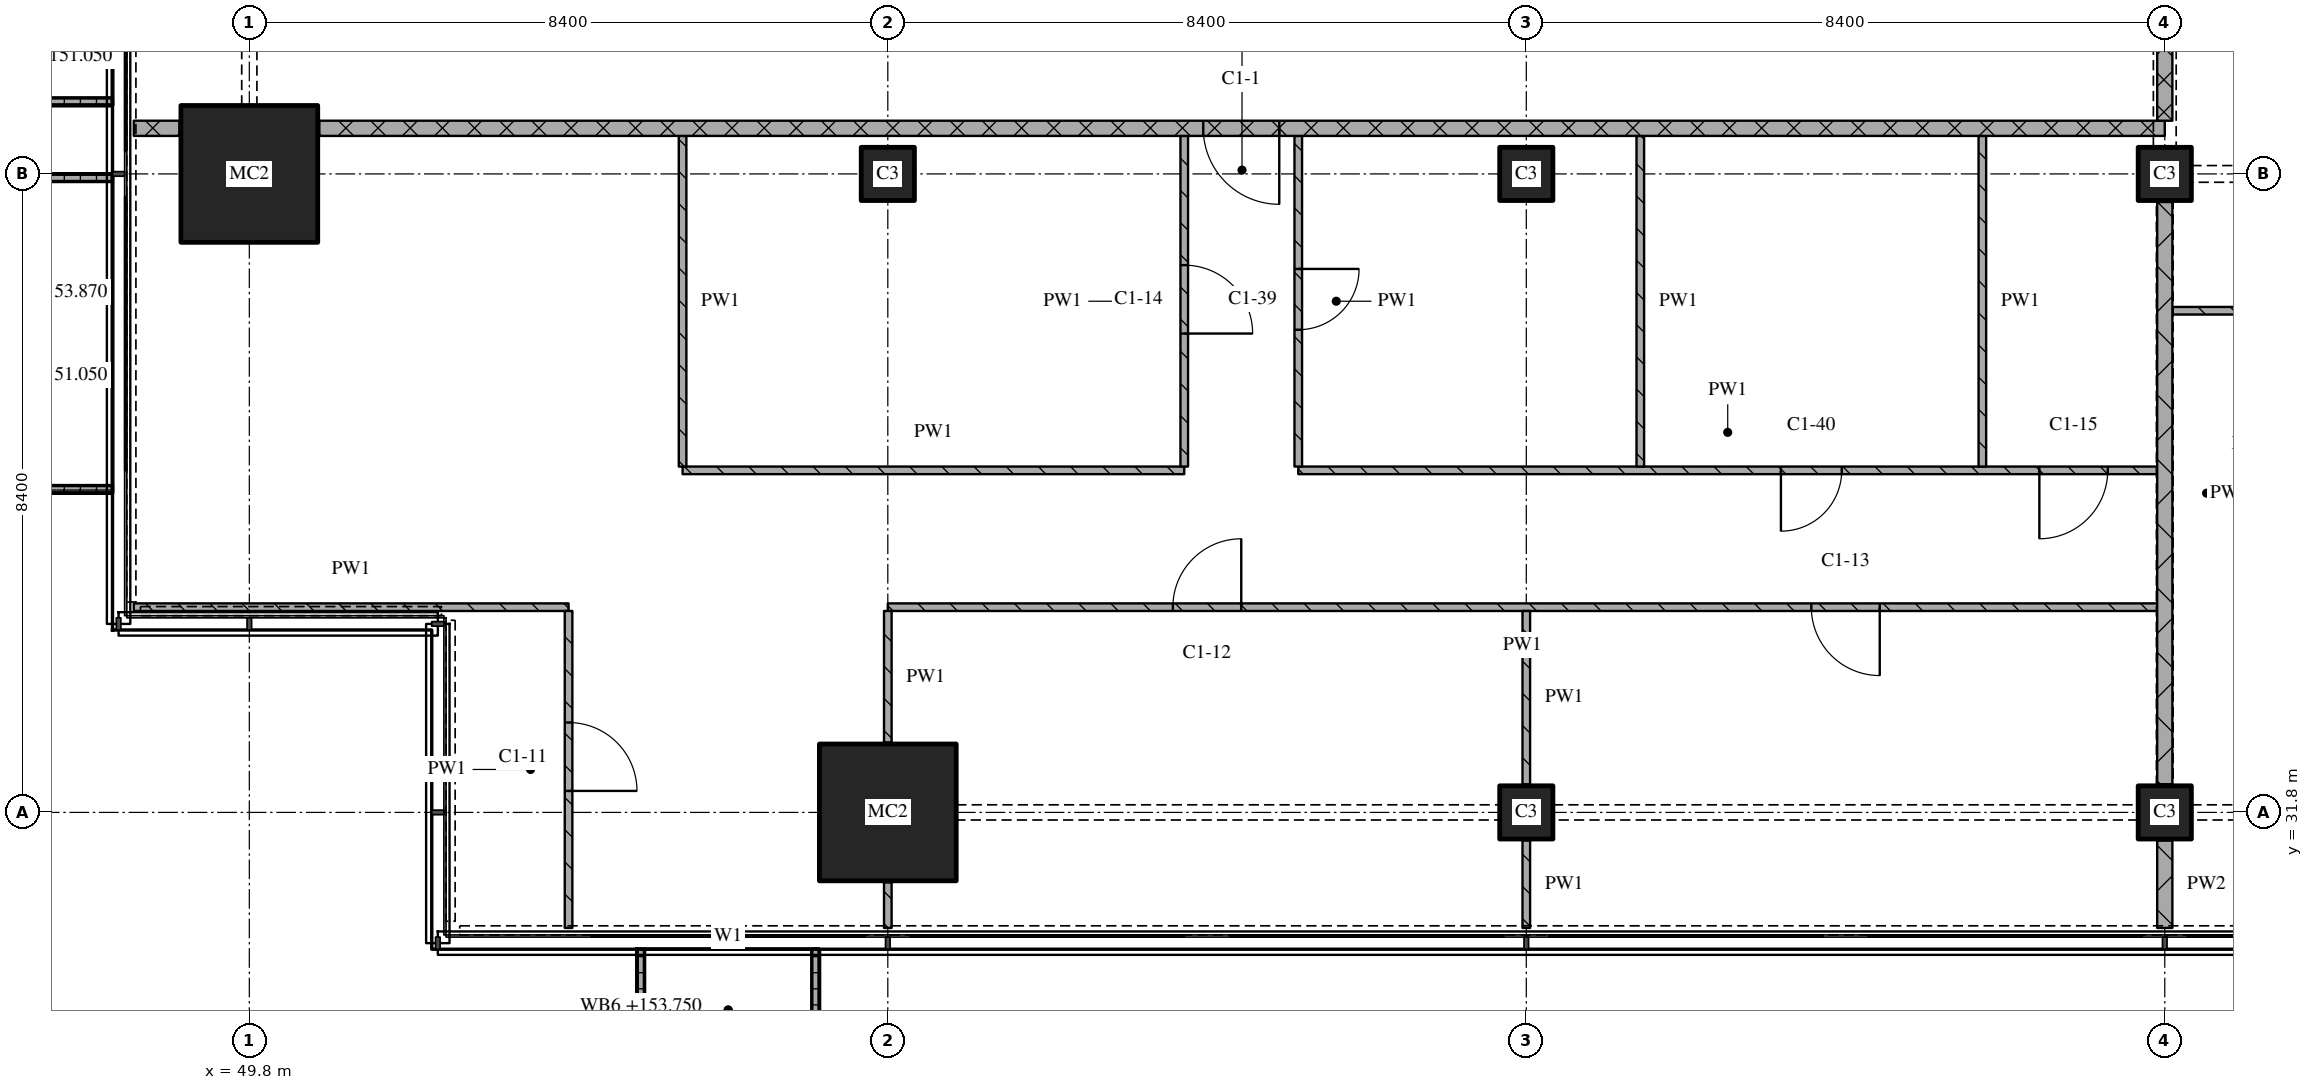
"""IFC4 building model, lengths in metres.
Left out: names, types, materials, properties, quantities, classifications, styles, units other than length and angle.
Written with IfcOpenShell. Run it as: python <this file> out.ifc"""

import sys

from ifc_helpers import new_model, si_unit, direction, frame, frame_2d, origin, origin_2d, place, context, subcontext, project, spatial, polyline, rectangle, outline, extrude, element, fill, save


model = new_model("IFC4")
c1 = context("Model", 3, precision=1e-05, world=origin(), true_north=direction((0.0, 1.0)))
c2 = subcontext(c1, "Body", "Model", "MODEL_VIEW")
j1 = project(units=[si_unit("LENGTHUNIT", "METRE"), si_unit("PLANEANGLEUNIT", "RADIAN")], contexts=[c1])
p1 = place(None, origin())
s1 = spatial("IfcSite", under=j1, at=p1, CompositionType="ELEMENT")
p2 = place(p1, origin())
s2 = spatial("IfcBuilding", under=s1, at=p2, CompositionType="ELEMENT")
p3 = place(p2, frame((0.0, 0.0, 151.05)))
s3 = spatial("IfcBuildingStorey", under=s2, at=p3, CompositionType="ELEMENT", Elevation=151.05)
for number, where, z_axis, x_axis in (
    (1, (49.8, 40.2, 0.0), (0.0, 0.0, 1.0), (1.0, 0.0, 0.0)),
    (2, (58.2, 31.8, 0.0), (0.0, 0.0, 1.0), (1.0, 0.0, 0.0)),
):
    element("IfcColumn", number, at=place(p3, frame(where, z_axis=z_axis, x_axis=x_axis)), inside=s3, PredefinedType="COLUMN", context=c2, shape_type="SweptSolid", body=[
        extrude(rectangle(XDim=1.8, YDim=1.8, at=origin_2d()), origin(), (0.0, 0.0, 1.0), 3.6),
    ])
for number, where, z_axis, x_axis in (
    (3, (58.2, 40.2, 0.0), (0.0, 0.0, 1.0), (1.0, 0.0, 0.0)),
    (4, (66.6, 31.8, 0.0), (0.0, 0.0, 1.0), (1.0, 0.0, 0.0)),
    (5, (66.6, 40.2, 0.0), (0.0, 0.0, 1.0), (1.0, 0.0, 0.0)),
    (6, (75.0, 31.8, 0.0), (0.0, 0.0, 1.0), (1.0, 0.0, 0.0)),
    (7, (75.0, 40.2, 0.0), (0.0, 0.0, 1.0), (1.0, 0.0, 0.0)),
):
    element("IfcColumn", number, at=place(p3, frame(where, z_axis=z_axis, x_axis=x_axis)), inside=s3, PredefinedType="COLUMN", context=c2, shape_type="SweptSolid", body=[
        extrude(rectangle(XDim=0.7, YDim=0.7, at=origin_2d()), origin(), (0.0, 0.0, 1.0), 3.6),
    ])
p4 = place(p3, origin())
e8 = element("IfcWall", 8, at=p4, inside=s3, PredefinedType="SOLIDWALL", context=c2, shape_type="SweptSolid", body=[
    extrude(outline(polyline([(54.9, 30.0), (55.0, 30.0), (55.0, 28.5), (57.2, 28.5), (57.2, 30.0), (57.3, 30.0), (57.3, 28.4), (54.9, 28.4), (54.9, 30.0)])), origin(), (0.0, 0.0, 1.0), 1.0),
])
p5 = place(p3, origin())
e9 = element("IfcWall", 9, at=p5, inside=s3, PredefinedType="SOLIDWALL", context=c2, shape_type="SweptSolid", body=[
    extrude(outline(polyline([(48.0, 43.5), (48.0, 43.4), (46.5, 43.4), (46.5, 41.2), (48.0, 41.2), (48.0, 41.1), (46.4, 41.1), (46.4, 43.5), (48.0, 43.5)])), origin(), (0.0, 0.0, 1.0), 1.0),
])
p6 = place(p3, origin())
e10 = element("IfcWall", 10, at=p6, inside=s3, PredefinedType="SOLIDWALL", context=c2, shape_type="SweptSolid", body=[
    extrude(outline(polyline([(48.0, 40.2), (48.0, 40.1), (46.367, 40.1), (46.367, 36.1), (48.0, 36.1), (48.0, 36.0), (46.267, 36.0), (46.267, 40.2), (48.0, 40.2)])), origin(), (0.0, 0.0, 1.0), 1.0),
])
p7 = place(p3, frame((48.28, 34.5, 0.0), z_axis=(0.0, 0.0, 1.0), x_axis=(1.0, 0.0, 0.0)))
e11 = element("IfcWall", 11, at=p7, inside=s3, PredefinedType="PARTITIONING", context=c2, shape_type="SweptSolid", body=[
    extrude(rectangle(XDim=5.72, YDim=0.1, at=frame_2d((2.86, 0.0))), origin(), (0.0, 0.0, 1.0), 3.32),
])
p8 = place(p3, frame((74.9, 34.5, 0.0), z_axis=(0.0, 0.0, 1.0), x_axis=(-1.0, 0.0, 0.0)))
e12 = element("IfcWall", 12, at=p8, inside=s3, PredefinedType="PARTITIONING", context=c2, shape_type="SweptSolid", body=[
    extrude(rectangle(XDim=16.7, YDim=0.1, at=frame_2d((8.35, 0.0))), origin(), (0.0, 0.0, 1.0), 3.32),
])
p9 = place(p8, frame((3.65, 0.0, 0.0)))
e13 = element("IfcOpeningElement", 13, at=p9, cuts=e12, PredefinedType="OPENING", context=c2, shape_type="SweptSolid", body=[
    extrude(rectangle(XDim=0.9, YDim=2.1, at=frame_2d((0.45, 1.05))), frame((0.0, 0.06, 0.0), z_axis=(0.0, -1.0, 0.0), x_axis=(1.0, 0.0, 0.0)), (0.0, 0.0, 1.0), 0.12),
])
p10 = place(p8, frame((12.05, 0.0, 0.0)))
e14 = element("IfcOpeningElement", 14, at=p10, cuts=e12, PredefinedType="OPENING", context=c2, shape_type="SweptSolid", body=[
    extrude(rectangle(XDim=0.9, YDim=2.1, at=frame_2d((0.45, 1.05))), frame((0.0, 0.06, 0.0), z_axis=(0.0, -1.0, 0.0), x_axis=(1.0, 0.0, 0.0)), (0.0, 0.0, 1.0), 0.12),
])
p11 = place(p3, frame((55.5, 36.3, 0.0), z_axis=(0.0, 0.0, 1.0), x_axis=(1.0, 0.0, 0.0)))
e15 = element("IfcWall", 15, at=p11, inside=s3, PredefinedType="PARTITIONING", context=c2, shape_type="SweptSolid", body=[
    extrude(rectangle(XDim=6.6, YDim=0.1, at=frame_2d((3.3, 0.0))), origin(), (0.0, 0.0, 1.0), 3.32),
])
p12 = place(p3, frame((63.6, 36.3, 0.0), z_axis=(0.0, 0.0, 1.0), x_axis=(1.0, 0.0, 0.0)))
e16 = element("IfcWall", 16, at=p12, inside=s3, PredefinedType="PARTITIONING", context=c2, shape_type="SweptSolid", body=[
    extrude(rectangle(XDim=11.3, YDim=0.1, at=frame_2d((5.65, 0.0))), origin(), (0.0, 0.0, 1.0), 3.32),
])
p13 = place(p12, frame((6.35, 0.0, 0.0)))
e17 = element("IfcOpeningElement", 17, at=p13, cuts=e16, PredefinedType="OPENING", context=c2, shape_type="SweptSolid", body=[
    extrude(rectangle(XDim=0.8, YDim=2.1, at=frame_2d((0.4, 1.05))), frame((0.0, 0.06, 0.0), z_axis=(0.0, -1.0, 0.0), x_axis=(1.0, 0.0, 0.0)), (0.0, 0.0, 1.0), 0.12),
])
p14 = place(p12, frame((9.75, 0.0, 0.0)))
e18 = element("IfcOpeningElement", 18, at=p14, cuts=e16, PredefinedType="OPENING", context=c2, shape_type="SweptSolid", body=[
    extrude(rectangle(XDim=0.9, YDim=2.1, at=frame_2d((0.45, 1.05))), frame((0.0, 0.06, 0.0), z_axis=(0.0, -1.0, 0.0), x_axis=(1.0, 0.0, 0.0)), (0.0, 0.0, 1.0), 0.12),
])
p15 = place(p3, frame((75.1, 38.4, 0.0), z_axis=(0.0, 0.0, 1.0), x_axis=(1.0, 0.0, 0.0)))
e19 = element("IfcWall", 19, at=p15, inside=s3, PredefinedType="PARTITIONING", context=c2, shape_type="SweptSolid", body=[
    extrude(rectangle(XDim=2.9, YDim=0.1, at=frame_2d((1.45, 0.0))), origin(), (0.0, 0.0, 1.0), 3.32),
])
p16 = place(p15, frame((1.0, 0.0, 0.0)))
e20 = element("IfcOpeningElement", 20, at=p16, cuts=e19, PredefinedType="OPENING", context=c2, shape_type="SweptSolid", body=[
    extrude(rectangle(XDim=0.8, YDim=2.1, at=frame_2d((0.4, 1.05))), frame((0.0, 0.06, 0.0), z_axis=(0.0, -1.0, 0.0), x_axis=(1.0, 0.0, 0.0)), (0.0, 0.0, 1.0), 0.12),
])
p17 = place(p3, frame((48.28, 40.8, 0.0), z_axis=(0.0, 0.0, 1.0), x_axis=(1.0, 0.0, 0.0)))
e21 = element("IfcWall", 21, at=p17, inside=s3, PredefinedType="PARTITIONING", context=c2, shape_type="SweptSolid", body=[
    extrude(rectangle(XDim=0.6, YDim=0.2, at=frame_2d((0.3, 0.0))), origin(), (0.0, 0.0, 1.0), 3.32),
])
p18 = place(p3, frame((75.0, 40.8, 0.0), z_axis=(0.0, 0.0, 1.0), x_axis=(-1.0, 0.0, 0.0)))
e22 = element("IfcWall", 22, at=p18, inside=s3, PredefinedType="PARTITIONING", context=c2, shape_type="SweptSolid", body=[
    extrude(rectangle(XDim=24.28, YDim=0.2, at=frame_2d((12.14, 0.0))), origin(), (0.0, 0.0, 1.0), 3.32),
])
p19 = place(p18, frame((11.65, 0.0, 0.0)))
e23 = element("IfcOpeningElement", 23, at=p19, cuts=e22, PredefinedType="OPENING", context=c2, shape_type="SweptSolid", body=[
    extrude(rectangle(XDim=1.0, YDim=2.1, at=frame_2d((0.5, 1.05))), frame((0.0, 0.11, 0.0), z_axis=(0.0, -1.0, 0.0), x_axis=(1.0, 0.0, 0.0)), (0.0, 0.0, 1.0), 0.22),
])
p20 = place(p3, frame((54.0, 30.28, 0.0), z_axis=(0.0, 0.0, 1.0), x_axis=(0.0, 1.0, 0.0)))
e24 = element("IfcWall", 24, at=p20, inside=s3, PredefinedType="PARTITIONING", context=c2, shape_type="SweptSolid", body=[
    extrude(rectangle(XDim=4.17, YDim=0.1, at=frame_2d((2.085, 0.0))), origin(), (0.0, 0.0, 1.0), 3.32),
])
p21 = place(p20, frame((1.803, 0.0, 0.0)))
e25 = element("IfcOpeningElement", 25, at=p21, cuts=e24, PredefinedType="OPENING", context=c2, shape_type="SweptSolid", body=[
    extrude(rectangle(XDim=0.9, YDim=2.1, at=frame_2d((0.45, 1.05))), frame((0.0, 0.06, 0.0), z_axis=(0.0, -1.0, 0.0), x_axis=(1.0, 0.0, 0.0)), (0.0, 0.0, 1.0), 0.12),
])
p22 = place(p3, frame((55.5, 40.7, 0.0), z_axis=(0.0, 0.0, 1.0), x_axis=(0.0, -1.0, 0.0)))
e26 = element("IfcWall", 26, at=p22, inside=s3, PredefinedType="PARTITIONING", context=c2, shape_type="SweptSolid", body=[
    extrude(rectangle(XDim=4.35, YDim=0.1, at=frame_2d((2.175, 0.0))), origin(), (0.0, 0.0, 1.0), 3.32),
])
p23 = place(p3, frame((58.2, 30.88, 0.0), z_axis=(0.0, 0.0, 1.0), x_axis=(0.0, -1.0, 0.0)))
e27 = element("IfcWall", 27, at=p23, inside=s3, PredefinedType="PARTITIONING", context=c2, shape_type="SweptSolid", body=[
    extrude(rectangle(XDim=0.6, YDim=0.1, at=frame_2d((0.3, 0.0))), origin(), (0.0, 0.0, 1.0), 3.32),
])
p24 = place(p3, frame((58.2, 34.45, 0.0), z_axis=(0.0, 0.0, 1.0), x_axis=(0.0, -1.0, 0.0)))
e28 = element("IfcWall", 28, at=p24, inside=s3, PredefinedType="PARTITIONING", context=c2, shape_type="SweptSolid", body=[
    extrude(rectangle(XDim=1.73, YDim=0.1, at=frame_2d((0.865, 0.0))), origin(), (0.0, 0.0, 1.0), 3.32),
])
p25 = place(p3, frame((62.1, 36.35, 0.0), z_axis=(0.0, 0.0, 1.0), x_axis=(0.0, 1.0, 0.0)))
e29 = element("IfcWall", 29, at=p25, inside=s3, PredefinedType="PARTITIONING", context=c2, shape_type="SweptSolid", body=[
    extrude(rectangle(XDim=4.35, YDim=0.1, at=frame_2d((2.175, 0.0))), origin(), (0.0, 0.0, 1.0), 3.32),
])
p26 = place(p25, frame((1.75, 0.0, 0.0)))
e30 = element("IfcOpeningElement", 30, at=p26, cuts=e29, PredefinedType="OPENING", context=c2, shape_type="SweptSolid", body=[
    extrude(rectangle(XDim=0.9, YDim=2.1, at=frame_2d((0.45, 1.05))), frame((0.0, 0.06, 0.0), z_axis=(0.0, -1.0, 0.0), x_axis=(1.0, 0.0, 0.0)), (0.0, 0.0, 1.0), 0.12),
])
p27 = place(p3, frame((63.6, 40.7, 0.0), z_axis=(0.0, 0.0, 1.0), x_axis=(0.0, -1.0, 0.0)))
e31 = element("IfcWall", 31, at=p27, inside=s3, PredefinedType="PARTITIONING", context=c2, shape_type="SweptSolid", body=[
    extrude(rectangle(XDim=4.35, YDim=0.1, at=frame_2d((2.175, 0.0))), origin(), (0.0, 0.0, 1.0), 3.32),
])
p28 = place(p27, frame((1.75, 0.0, 0.0)))
e32 = element("IfcOpeningElement", 32, at=p28, cuts=e31, PredefinedType="OPENING", context=c2, shape_type="SweptSolid", body=[
    extrude(rectangle(XDim=0.8, YDim=2.1, at=frame_2d((0.4, 1.05))), frame((0.0, 0.06, 0.0), z_axis=(0.0, -1.0, 0.0), x_axis=(1.0, 0.0, 0.0)), (0.0, 0.0, 1.0), 0.12),
])
p29 = place(p3, frame((66.6, 31.43, 0.0), z_axis=(0.0, 0.0, 1.0), x_axis=(0.0, -1.0, 0.0)))
e33 = element("IfcWall", 33, at=p29, inside=s3, PredefinedType="PARTITIONING", context=c2, shape_type="SweptSolid", body=[
    extrude(rectangle(XDim=1.15, YDim=0.1, at=frame_2d((0.575, 0.0))), origin(), (0.0, 0.0, 1.0), 3.32),
])
p30 = place(p3, frame((66.6, 34.45, 0.0), z_axis=(0.0, 0.0, 1.0), x_axis=(0.0, -1.0, 0.0)))
e34 = element("IfcWall", 34, at=p30, inside=s3, PredefinedType="PARTITIONING", context=c2, shape_type="SweptSolid", body=[
    extrude(rectangle(XDim=2.28, YDim=0.1, at=frame_2d((1.14, 0.0))), origin(), (0.0, 0.0, 1.0), 3.32),
])
for number, where, z_axis, x_axis in (
    (35, (68.1, 40.7, 0.0), (0.0, 0.0, 1.0), (0.0, -1.0, 0.0)),
    (36, (72.6, 40.7, 0.0), (0.0, 0.0, 1.0), (0.0, -1.0, 0.0)),
):
    element("IfcWall", number, at=place(p3, frame(where, z_axis=z_axis, x_axis=x_axis)), inside=s3, PredefinedType="PARTITIONING", context=c2, shape_type="SweptSolid", body=[
        extrude(rectangle(XDim=4.35, YDim=0.1, at=frame_2d((2.175, 0.0))), origin(), (0.0, 0.0, 1.0), 3.32),
    ])
p31 = place(p3, frame((75.0, 43.1, 0.0), z_axis=(0.0, 0.0, 1.0), x_axis=(0.0, -1.0, 0.0)))
e37 = element("IfcWall", 37, at=p31, inside=s3, PredefinedType="PARTITIONING", context=c2, shape_type="SweptSolid", body=[
    extrude(rectangle(XDim=2.2, YDim=0.2, at=frame_2d((1.1, 0.0))), origin(), (0.0, 0.0, 1.0), 2.43),
])
p32 = place(p3, frame((75.0, 31.43, 0.0), z_axis=(0.0, 0.0, 1.0), x_axis=(0.0, -1.0, 0.0)))
e38 = element("IfcWall", 38, at=p32, inside=s3, PredefinedType="PARTITIONING", context=c2, shape_type="SweptSolid", body=[
    extrude(rectangle(XDim=1.15, YDim=0.2, at=frame_2d((0.575, 0.0))), origin(), (0.0, 0.0, 1.0), 3.32),
])
p33 = place(p3, frame((75.0, 39.83, 0.0), z_axis=(0.0, 0.0, 1.0), x_axis=(0.0, -1.0, 0.0)))
e39 = element("IfcWall", 39, at=p33, inside=s3, PredefinedType="PARTITIONING", context=c2, shape_type="SweptSolid", body=[
    extrude(rectangle(XDim=7.66, YDim=0.2, at=frame_2d((3.83, 0.0))), origin(), (0.0, 0.0, 1.0), 2.72),
])
p34 = place(p9, origin())
e40 = element("IfcDoor", 40, at=p34, inside=s3, OperationType="SINGLE_SWING_LEFT", PredefinedType="DOOR", context=c2, shape_type="SweptSolid", body=[
    extrude(rectangle(XDim=0.9, YDim=2.1, at=frame_2d((0.45, 1.05))), frame((0.0, 0.025, 0.0), z_axis=(0.0, -1.0, 0.0), x_axis=(1.0, 0.0, 0.0)), (0.0, 0.0, 1.0), 0.05),
])
fill(e13, e40)
p35 = place(p10, origin())
e41 = element("IfcDoor", 41, at=p35, inside=s3, OperationType="SINGLE_SWING_RIGHT", PredefinedType="DOOR", context=c2, shape_type="SweptSolid", body=[
    extrude(rectangle(XDim=0.9, YDim=2.1, at=frame_2d((0.45, 1.05))), frame((0.0, 0.025, 0.0), z_axis=(0.0, -1.0, 0.0), x_axis=(1.0, 0.0, 0.0)), (0.0, 0.0, 1.0), 0.05),
])
fill(e14, e41)
p36 = place(p13, origin())
e42 = element("IfcDoor", 42, at=p36, inside=s3, OperationType="SINGLE_SWING_RIGHT", PredefinedType="DOOR", context=c2, shape_type="SweptSolid", body=[
    extrude(rectangle(XDim=0.8, YDim=2.1, at=frame_2d((0.4, 1.05))), frame((0.0, 0.025, 0.0), z_axis=(0.0, -1.0, 0.0), x_axis=(1.0, 0.0, 0.0)), (0.0, 0.0, 1.0), 0.05),
])
fill(e17, e42)
p37 = place(p14, origin())
e43 = element("IfcDoor", 43, at=p37, inside=s3, OperationType="SINGLE_SWING_RIGHT", PredefinedType="DOOR", context=c2, shape_type="SweptSolid", body=[
    extrude(rectangle(XDim=0.9, YDim=2.1, at=frame_2d((0.45, 1.05))), frame((0.0, 0.025, 0.0), z_axis=(0.0, -1.0, 0.0), x_axis=(1.0, 0.0, 0.0)), (0.0, 0.0, 1.0), 0.05),
])
fill(e18, e43)
p38 = place(p19, origin())
e44 = element("IfcDoor", 44, at=p38, inside=s3, OperationType="SINGLE_SWING_LEFT", PredefinedType="DOOR", context=c2, shape_type="SweptSolid", body=[
    extrude(rectangle(XDim=1.0, YDim=2.1, at=frame_2d((0.5, 1.05))), frame((0.0, 0.025, 0.0), z_axis=(0.0, -1.0, 0.0), x_axis=(1.0, 0.0, 0.0)), (0.0, 0.0, 1.0), 0.05),
])
fill(e23, e44)
p39 = place(p21, origin())
e45 = element("IfcDoor", 45, at=p39, inside=s3, OperationType="SINGLE_SWING_RIGHT", PredefinedType="DOOR", context=c2, shape_type="SweptSolid", body=[
    extrude(rectangle(XDim=0.9, YDim=2.1, at=frame_2d((0.45, 1.05))), frame((0.0, 0.025, 0.0), z_axis=(0.0, -1.0, 0.0), x_axis=(1.0, 0.0, 0.0)), (0.0, 0.0, 1.0), 0.05),
])
fill(e25, e45)
p40 = place(p26, origin())
e46 = element("IfcDoor", 46, at=p40, inside=s3, OperationType="SINGLE_SWING_RIGHT", PredefinedType="DOOR", context=c2, shape_type="SweptSolid", body=[
    extrude(rectangle(XDim=0.9, YDim=2.1, at=frame_2d((0.45, 1.05))), frame((0.0, 0.025, 0.0), z_axis=(0.0, -1.0, 0.0), x_axis=(1.0, 0.0, 0.0)), (0.0, 0.0, 1.0), 0.05),
])
fill(e30, e46)
p41 = place(p28, origin())
e47 = element("IfcDoor", 47, at=p41, inside=s3, OperationType="SINGLE_SWING_LEFT", PredefinedType="DOOR", context=c2, shape_type="SweptSolid", body=[
    extrude(rectangle(XDim=0.8, YDim=2.1, at=frame_2d((0.4, 1.05))), frame((0.0, 0.025, 0.0), z_axis=(0.0, -1.0, 0.0), x_axis=(1.0, 0.0, 0.0)), (0.0, 0.0, 1.0), 0.05),
])
fill(e32, e47)
save(model, sys.argv[1])
